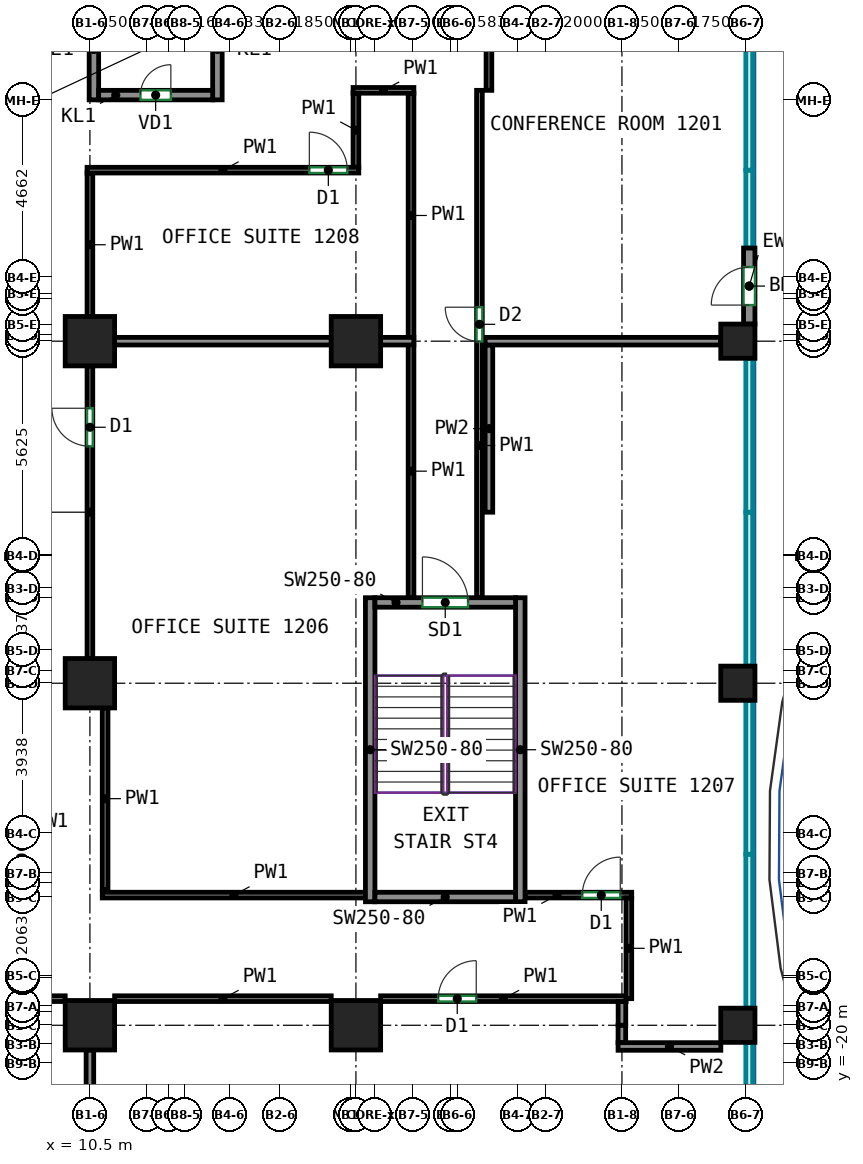
"""IFC4 building model, lengths in metres.
Left out: names, types, materials, properties, quantities, classifications, styles, units other than length and angle.
Written with IfcOpenShell. Run it as: python <this file> out.ifc"""

import sys

from ifc_helpers import new_model, si_unit, direction, frame, frame_2d, origin, origin_2d, place, context, subcontext, project, spatial, rectangle, extrude, source, transform, mapped, element, fill, save


model = new_model("IFC4")
c1 = context("Model", 3, precision=1e-05, world=origin(), true_north=direction((0.0, 1.0)))
c2 = subcontext(c1, "Body", "Model", "MODEL_VIEW")
j1 = project(units=[si_unit("LENGTHUNIT", "METRE"), si_unit("PLANEANGLEUNIT", "RADIAN")], contexts=[c1])
p1 = place(None, origin())
s1 = spatial("IfcSite", under=j1, at=p1, CompositionType="ELEMENT")
p2 = place(p1, origin())
s2 = spatial("IfcBuilding", under=s1, at=p2, CompositionType="ELEMENT")
p3 = place(p2, frame((0.0, 0.0, 55.0)))
s3 = spatial("IfcBuildingStorey", under=s2, at=p3, CompositionType="ELEMENT", Elevation=55.0)
m1 = source(origin(), c2, "Body", "SweptSolid", [
    extrude(rectangle(XDim=1.3, YDim=1.3, at=origin_2d()), origin(), (0.0, 0.0, 1.0), 3.6),
])
for number, where, z_axis, x_axis in (
    (1, (10.5, -19.0, 0.0), (0.0, 0.0, 1.0), (1.0, 0.0, 0.0)),
    (2, (10.5, -10.0, 0.0), (0.0, 0.0, 1.0), (1.0, 0.0, 0.0)),
    (3, (10.5, -1.0, 0.0), (0.0, 0.0, 1.0), (1.0, 0.0, 0.0)),
    (4, (17.5, -19.0, 0.0), (0.0, 0.0, 1.0), (1.0, 0.0, 0.0)),
    (5, (17.5, -1.0, 0.0), (0.0, 0.0, 1.0), (1.0, 0.0, 0.0)),
):
    element("IfcColumn", number, at=place(p3, frame(where, z_axis=z_axis, x_axis=x_axis)), inside=s3, PredefinedType="COLUMN", context=c2, shape_type="MappedRepresentation", body=[
        mapped(m1, transform((0.0, 0.0, 0.0))),
    ])
m2 = source(origin(), c2, "Body", "SweptSolid", [
    extrude(rectangle(XDim=0.9, YDim=0.9, at=origin_2d()), origin(), (0.0, 0.0, 1.0), 3.6),
])
for number, where, z_axis, x_axis in (
    (6, (27.55, -19.0, 0.0), (0.0, 0.0, 1.0), (1.0, 0.0, 0.0)),
    (7, (27.55, -10.0, 0.0), (0.0, 0.0, 1.0), (1.0, 0.0, 0.0)),
    (8, (27.55, -1.0, 0.0), (0.0, 0.0, 1.0), (1.0, 0.0, 0.0)),
):
    element("IfcColumn", number, at=place(p3, frame(where, z_axis=z_axis, x_axis=x_axis)), inside=s3, PredefinedType="COLUMN", context=c2, shape_type="MappedRepresentation", body=[
        mapped(m2, transform((0.0, 0.0, 0.0))),
    ])
m3 = source(origin(), c2, "Body", "SweptSolid", [
    extrude(rectangle(XDim=8.0, YDim=0.25, at=frame_2d((4.0, 0.0))), origin(), (0.0, 0.0, 1.0), 3.6),
])
for number, where, z_axis, x_axis in (
    (9, (17.875, -15.75, 0.0), (0.0, 0.0, 1.0), (0.0, 1.0, 0.0)),
    (10, (21.825, -15.75, 0.0), (0.0, 0.0, 1.0), (0.0, 1.0, 0.0)),
):
    element("IfcWall", number, at=place(p3, frame(where, z_axis=z_axis, x_axis=x_axis)), inside=s3, PredefinedType="SHEAR", context=c2, shape_type="MappedRepresentation", body=[
        mapped(m3, transform((0.0, 0.0, 0.0))),
    ])
m4 = source(origin(), c2, "Body", "SweptSolid", [
    extrude(rectangle(XDim=3.7, YDim=0.25, at=frame_2d((1.85, 0.0))), origin(), (0.0, 0.0, 1.0), 3.6),
])
p4 = place(p3, frame((18.0, -15.625, 0.0), z_axis=(0.0, 0.0, 1.0), x_axis=(1.0, 0.0, 0.0)))
e11 = element("IfcWall", 11, at=p4, inside=s3, PredefinedType="SHEAR", context=c2, shape_type="MappedRepresentation", body=[
    mapped(m4, transform((0.0, 0.0, 0.0))),
])
p5 = place(p3, frame((18.0, -7.875, 0.0), z_axis=(0.0, 0.0, 1.0), x_axis=(1.0, 0.0, 0.0)))
e12 = element("IfcWall", 12, at=p5, inside=s3, PredefinedType="SHEAR", context=c2, shape_type="MappedRepresentation", body=[
    mapped(m4, transform((0.0, 0.0, 0.0))),
])
p6 = place(p5, frame((1.25, 0.0, 0.0)))
e13 = element("IfcOpeningElement", 13, at=p6, cuts=e12, PredefinedType="OPENING", context=c2, shape_type="SweptSolid", body=[
    extrude(rectangle(XDim=1.2, YDim=2.1, at=frame_2d((0.6, 1.05))), frame((0.0, 0.135, 0.0), z_axis=(0.0, -1.0, 0.0), x_axis=(1.0, 0.0, 0.0)), (0.0, 0.0, 1.0), 0.27),
])
m5 = source(origin(), c2, "Body", "SweptSolid", [
    extrude(rectangle(XDim=2.0, YDim=0.3, at=frame_2d((1.0, 0.0))), origin(), (0.0, 0.0, 1.0), 3.6),
])
p7 = place(p3, frame((27.85, -0.55, 0.0), z_axis=(0.0, 0.0, 1.0), x_axis=(0.0, 1.0, 0.0)))
e14 = element("IfcWall", 14, at=p7, inside=s3, PredefinedType="SOLIDWALL", context=c2, shape_type="MappedRepresentation", body=[
    mapped(m5, transform((0.0, 0.0, 0.0))),
])
p8 = place(p7, frame((0.5, 0.0, 0.0)))
e15 = element("IfcOpeningElement", 15, at=p8, cuts=e14, PredefinedType="OPENING", context=c2, shape_type="SweptSolid", body=[
    extrude(rectangle(XDim=1.0, YDim=2.1, at=frame_2d((0.5, 1.05))), frame((0.0, 0.16, 0.0), z_axis=(0.0, -1.0, 0.0), x_axis=(1.0, 0.0, 0.0)), (0.0, 0.0, 1.0), 0.32),
])
m6 = source(origin(), c2, "Body", "SweptSolid", [
    extrude(rectangle(XDim=2.65, YDim=0.25, at=frame_2d((1.325, 0.0))), origin(), (0.0, 0.0, 1.0), 3.6),
])
for number, where, z_axis, x_axis in (
    (16, (10.605, 5.35, 0.0), (0.0, 0.0, 1.0), (0.0, 1.0, 0.0)),
    (17, (13.855, 5.35, 0.0), (0.0, 0.0, 1.0), (0.0, 1.0, 0.0)),
):
    element("IfcWall", number, at=place(p3, frame(where, z_axis=z_axis, x_axis=x_axis)), inside=s3, PredefinedType="PARTITIONING", context=c2, shape_type="MappedRepresentation", body=[
        mapped(m6, transform((0.0, 0.0, 0.0))),
    ])
m7 = source(origin(), c2, "Body", "SweptSolid", [
    extrude(rectangle(XDim=3.0, YDim=0.25, at=frame_2d((1.5, 0.0))), origin(), (0.0, 0.0, 1.0), 3.6),
])
p9 = place(p3, frame((10.73, 5.475, 0.0), z_axis=(0.0, 0.0, 1.0), x_axis=(1.0, 0.0, 0.0)))
e18 = element("IfcWall", 18, at=p9, inside=s3, PredefinedType="PARTITIONING", context=c2, shape_type="MappedRepresentation", body=[
    mapped(m7, transform((0.0, 0.0, 0.0))),
])
p10 = place(p9, frame((1.1, 0.0, 0.0)))
e19 = element("IfcOpeningElement", 19, at=p10, cuts=e18, PredefinedType="OPENING", context=c2, shape_type="SweptSolid", body=[
    extrude(rectangle(XDim=0.8, YDim=2.0, at=frame_2d((0.4, 1.0))), frame((0.0, 0.135, 0.0), z_axis=(0.0, -1.0, 0.0), x_axis=(1.0, 0.0, 0.0)), (0.0, 0.0, 1.0), 0.27),
])
p11 = place(p3, frame((4.15, -18.3, 0.0), z_axis=(0.0, 0.0, 1.0), x_axis=(1.0, 0.0, 0.0)))
e20 = element("IfcWall", 20, at=p11, inside=s3, PredefinedType="PARTITIONING", context=c2, shape_type="SweptSolid", body=[
    extrude(rectangle(XDim=5.7, YDim=0.15, at=frame_2d((2.85, 0.0))), origin(), (0.0, 0.0, 1.0), 3.6),
])
p12 = place(p11, frame((3.372, 0.0, 0.0)))
e21 = element("IfcOpeningElement", 21, at=p12, cuts=e20, PredefinedType="OPENING", context=c2, shape_type="SweptSolid", body=[
    extrude(rectangle(XDim=0.9, YDim=2.1, at=frame_2d((0.45, 1.05))), frame((0.0, 0.085, 0.0), z_axis=(0.0, -1.0, 0.0), x_axis=(1.0, 0.0, 0.0)), (0.0, 0.0, 1.0), 0.17),
])
p13 = place(p3, frame((11.15, -18.3, 0.0), z_axis=(0.0, 0.0, 1.0), x_axis=(1.0, 0.0, 0.0)))
e22 = element("IfcWall", 22, at=p13, inside=s3, PredefinedType="PARTITIONING", context=c2, shape_type="SweptSolid", body=[
    extrude(rectangle(XDim=5.7, YDim=0.15, at=frame_2d((2.85, 0.0))), origin(), (0.0, 0.0, 1.0), 3.6),
])
p14 = place(p3, frame((18.15, -18.3, 0.0), z_axis=(0.0, 0.0, 1.0), x_axis=(1.0, 0.0, 0.0)))
e23 = element("IfcWall", 23, at=p14, inside=s3, PredefinedType="PARTITIONING", context=c2, shape_type="SweptSolid", body=[
    extrude(rectangle(XDim=6.46, YDim=0.15, at=frame_2d((3.23, 0.0))), origin(), (0.0, 0.0, 1.0), 3.6),
])
p15 = place(p14, frame((1.516, 0.0, 0.0)))
e24 = element("IfcOpeningElement", 24, at=p15, cuts=e23, PredefinedType="OPENING", context=c2, shape_type="SweptSolid", body=[
    extrude(rectangle(XDim=1.0, YDim=2.1, at=frame_2d((0.5, 1.05))), frame((0.0, 0.085, 0.0), z_axis=(0.0, -1.0, 0.0), x_axis=(1.0, 0.0, 0.0)), (0.0, 0.0, 1.0), 0.17),
])
p16 = place(p3, frame((10.5, -9.35, 0.0), z_axis=(0.0, 0.0, 1.0), x_axis=(0.0, 1.0, 0.0)))
e25 = element("IfcWall", 25, at=p16, inside=s3, PredefinedType="PARTITIONING", context=c2, shape_type="SweptSolid", body=[
    extrude(rectangle(XDim=7.7, YDim=0.15, at=frame_2d((3.85, 0.0))), origin(), (0.0, 0.0, 1.0), 2.95),
])
p17 = place(p16, frame((5.585, 0.0, 0.0)))
e26 = element("IfcOpeningElement", 26, at=p17, cuts=e25, PredefinedType="OPENING", context=c2, shape_type="SweptSolid", body=[
    extrude(rectangle(XDim=1.0, YDim=2.1, at=frame_2d((0.5, 1.05))), frame((0.0, 0.085, 0.0), z_axis=(0.0, -1.0, 0.0), x_axis=(1.0, 0.0, 0.0)), (0.0, 0.0, 1.0), 0.17),
])
p18 = place(p3, frame((10.9, -15.425, 0.0), z_axis=(0.0, 0.0, 1.0), x_axis=(0.0, 1.0, 0.0)))
e27 = element("IfcWall", 27, at=p18, inside=s3, PredefinedType="PARTITIONING", context=c2, shape_type="SweptSolid", body=[
    extrude(rectangle(XDim=4.775, YDim=0.15, at=frame_2d((2.388, 0.0))), origin(), (0.0, 0.0, 1.0), 3.6),
])
p19 = place(p3, frame((10.825, -15.575, 0.0), z_axis=(0.0, 0.0, 1.0), x_axis=(1.0, 0.0, 0.0)))
e28 = element("IfcWall", 28, at=p19, inside=s3, PredefinedType="PARTITIONING", context=c2, shape_type="SweptSolid", body=[
    extrude(rectangle(XDim=6.925, YDim=0.15, at=frame_2d((3.462, 0.0))), origin(), (0.0, 0.0, 1.0), 3.6),
])
p20 = place(p3, frame((18.95, -7.75, 0.0), z_axis=(0.0, 0.0, 1.0), x_axis=(0.0, 1.0, 0.0)))
e29 = element("IfcWall", 29, at=p20, inside=s3, PredefinedType="PARTITIONING", context=c2, shape_type="SweptSolid", body=[
    extrude(rectangle(XDim=6.66, YDim=0.15, at=frame_2d((3.33, 0.0))), origin(), (0.0, 0.0, 1.0), 3.6),
])
p21 = place(p3, frame((21.95, -15.575, 0.0), z_axis=(0.0, 0.0, 1.0), x_axis=(1.0, 0.0, 0.0)))
e30 = element("IfcWall", 30, at=p21, inside=s3, PredefinedType="PARTITIONING", context=c2, shape_type="SweptSolid", body=[
    extrude(rectangle(XDim=2.807, YDim=0.15, at=frame_2d((1.404, 0.0))), origin(), (0.0, 0.0, 1.0), 3.6),
])
p22 = place(p21, frame((1.506, 0.0, 0.0)))
e31 = element("IfcOpeningElement", 31, at=p22, cuts=e30, PredefinedType="OPENING", context=c2, shape_type="SweptSolid", body=[
    extrude(rectangle(XDim=1.0, YDim=2.1, at=frame_2d((0.5, 1.05))), frame((0.0, 0.085, 0.0), z_axis=(0.0, -1.0, 0.0), x_axis=(1.0, 0.0, 0.0)), (0.0, 0.0, 1.0), 0.17),
])
p23 = place(p3, frame((24.682, -18.3, 0.0), z_axis=(0.0, 0.0, 1.0), x_axis=(0.0, 1.0, 0.0)))
e32 = element("IfcWall", 32, at=p23, inside=s3, PredefinedType="PARTITIONING", context=c2, shape_type="SweptSolid", body=[
    extrude(rectangle(XDim=2.65, YDim=0.15, at=frame_2d((1.325, 0.0))), origin(), (0.0, 0.0, 1.0), 3.6),
])
p24 = place(p3, frame((20.75, -7.75, 0.0), z_axis=(0.0, 0.0, 1.0), x_axis=(0.0, 1.0, 0.0)))
e33 = element("IfcWall", 33, at=p24, inside=s3, PredefinedType="PARTITIONING", context=c2, shape_type="SweptSolid", body=[
    extrude(rectangle(XDim=13.35, YDim=0.15, at=frame_2d((6.675, 0.0))), origin(), (0.0, 0.0, 1.0), 3.6),
])
p25 = place(p24, frame((6.744, 0.0, 0.0)))
e34 = element("IfcOpeningElement", 34, at=p25, cuts=e33, PredefinedType="OPENING", context=c2, shape_type="SweptSolid", body=[
    extrude(rectangle(XDim=0.9, YDim=2.1, at=frame_2d((0.45, 1.05))), frame((0.0, 0.085, 0.0), z_axis=(0.0, -1.0, 0.0), x_axis=(1.0, 0.0, 0.0)), (0.0, 0.0, 1.0), 0.17),
])
p26 = place(p3, frame((10.5, -0.35, 0.0), z_axis=(0.0, 0.0, 1.0), x_axis=(0.0, 1.0, 0.0)))
e35 = element("IfcWall", 35, at=p26, inside=s3, PredefinedType="PARTITIONING", context=c2, shape_type="SweptSolid", body=[
    extrude(rectangle(XDim=3.775, YDim=0.15, at=frame_2d((1.888, 0.0))), origin(), (0.0, 0.0, 1.0), 3.6),
])
p27 = place(p3, frame((18.95, -0.91, 0.0), z_axis=(0.0, 0.0, 1.0), x_axis=(0.0, 1.0, 0.0)))
e36 = element("IfcWall", 36, at=p27, inside=s3, PredefinedType="PARTITIONING", context=c2, shape_type="SweptSolid", body=[
    extrude(rectangle(XDim=6.435, YDim=0.15, at=frame_2d((3.217, 0.0))), origin(), (0.0, 0.0, 1.0), 3.6),
])
p28 = place(p3, frame((17.425, 5.6, 0.0), z_axis=(0.0, 0.0, 1.0), x_axis=(1.0, 0.0, 0.0)))
e37 = element("IfcWall", 37, at=p28, inside=s3, PredefinedType="PARTITIONING", context=c2, shape_type="SweptSolid", body=[
    extrude(rectangle(XDim=1.6, YDim=0.15, at=frame_2d((0.8, 0.0))), origin(), (0.0, 0.0, 1.0), 3.6),
])
p29 = place(p3, frame((17.5, 3.575, 0.0), z_axis=(0.0, 0.0, 1.0), x_axis=(0.0, 1.0, 0.0)))
e38 = element("IfcWall", 38, at=p29, inside=s3, PredefinedType="PARTITIONING", context=c2, shape_type="SweptSolid", body=[
    extrude(rectangle(XDim=1.95, YDim=0.15, at=frame_2d((0.975, 0.0))), origin(), (0.0, 0.0, 1.0), 3.6),
])
p30 = place(p3, frame((10.425, 3.5, 0.0), z_axis=(0.0, 0.0, 1.0), x_axis=(1.0, 0.0, 0.0)))
e39 = element("IfcWall", 39, at=p30, inside=s3, PredefinedType="PARTITIONING", context=c2, shape_type="SweptSolid", body=[
    extrude(rectangle(XDim=7.15, YDim=0.15, at=frame_2d((3.575, 0.0))), origin(), (0.0, 0.0, 1.0), 3.6),
])
p31 = place(p30, frame((5.849, 0.0, 0.0)))
e40 = element("IfcOpeningElement", 40, at=p31, cuts=e39, PredefinedType="OPENING", context=c2, shape_type="SweptSolid", body=[
    extrude(rectangle(XDim=1.0, YDim=2.1, at=frame_2d((0.5, 1.05))), frame((0.0, 0.085, 0.0), z_axis=(0.0, -1.0, 0.0), x_axis=(1.0, 0.0, 0.0)), (0.0, 0.0, 1.0), 0.17),
])
p32 = place(p3, frame((21.0, 5.6, 0.0), z_axis=(0.0, 0.0, 1.0), x_axis=(0.0, 1.0, 0.0)))
e41 = element("IfcWall", 41, at=p32, inside=s3, PredefinedType="PARTITIONING", context=c2, shape_type="SweptSolid", body=[
    extrude(rectangle(XDim=4.15, YDim=0.15, at=frame_2d((2.075, 0.0))), origin(), (0.0, 0.0, 1.0), 3.6),
])
p33 = place(p3, frame((10.5, -27.1, 0.0), z_axis=(0.0, 0.0, 1.0), x_axis=(0.0, 1.0, 0.0)))
e42 = element("IfcWall", 42, at=p33, inside=s3, PredefinedType="PARTITIONING", context=c2, shape_type="SweptSolid", body=[
    extrude(rectangle(XDim=7.45, YDim=0.2, at=frame_2d((3.725, 0.0))), origin(), (0.0, 0.0, 1.0), 2.95),
])
p34 = place(p3, frame((24.498, -19.458, 0.0), z_axis=(0.0, 0.0, 1.0), x_axis=(0.0, 1.0, 0.0)))
e43 = element("IfcWall", 43, at=p34, inside=s3, PredefinedType="PARTITIONING", context=c2, shape_type="SweptSolid", body=[
    extrude(rectangle(XDim=0.46, YDim=0.2, at=frame_2d((0.23, 0.0))), origin(), (0.0, 0.0, 1.0), 2.95),
])
p35 = place(p3, frame((27.102, -19.558, 0.0), z_axis=(0.0, 0.0, 1.0), x_axis=(-1.0, 0.0, 0.0)))
e44 = element("IfcWall", 44, at=p35, inside=s3, PredefinedType="PARTITIONING", context=c2, shape_type="SweptSolid", body=[
    extrude(rectangle(XDim=2.704, YDim=0.2, at=frame_2d((1.352, 0.0))), origin(), (0.0, 0.0, 1.0), 3.6),
])
p36 = place(p3, frame((24.5, -18.998, 0.0), z_axis=(0.0, 0.0, 1.0), x_axis=(0.0, 1.0, 0.0)))
e45 = element("IfcWall", 45, at=p36, inside=s3, PredefinedType="PARTITIONING", context=c2, shape_type="SweptSolid", body=[
    extrude(rectangle(XDim=0.622, YDim=0.2, at=frame_2d((0.311, 0.0))), origin(), (0.0, 0.0, 1.0), 2.95),
])
p37 = place(p3, frame((11.15, -1.0, 0.0), z_axis=(0.0, 0.0, 1.0), x_axis=(1.0, 0.0, 0.0)))
e46 = element("IfcWall", 46, at=p37, inside=s3, PredefinedType="PARTITIONING", context=c2, shape_type="SweptSolid", body=[
    extrude(rectangle(XDim=5.7, YDim=0.2, at=frame_2d((2.85, 0.0))), origin(), (0.0, 0.0, 1.0), 2.95),
])
p38 = place(p3, frame((18.15, -1.0, 0.0), z_axis=(0.0, 0.0, 1.0), x_axis=(1.0, 0.0, 0.0)))
e47 = element("IfcWall", 47, at=p38, inside=s3, PredefinedType="PARTITIONING", context=c2, shape_type="SweptSolid", body=[
    extrude(rectangle(XDim=0.874, YDim=0.2, at=frame_2d((0.437, 0.0))), origin(), (0.0, 0.0, 1.0), 2.95),
])
p39 = place(p3, frame((21.0, -1.1, 0.0), z_axis=(0.0, 0.0, 1.0), x_axis=(0.0, -1.0, 0.0)))
e48 = element("IfcWall", 48, at=p39, inside=s3, PredefinedType="PARTITIONING", context=c2, shape_type="SweptSolid", body=[
    extrude(rectangle(XDim=4.4, YDim=0.2, at=frame_2d((2.2, 0.0))), origin(), (0.0, 0.0, 1.0), 3.6),
])
p40 = place(p3, frame((20.9, -1.0, 0.0), z_axis=(0.0, 0.0, 1.0), x_axis=(1.0, 0.0, 0.0)))
e49 = element("IfcWall", 49, at=p40, inside=s3, PredefinedType="PARTITIONING", context=c2, shape_type="SweptSolid", body=[
    extrude(rectangle(XDim=6.2, YDim=0.2, at=frame_2d((3.1, 0.0))), origin(), (0.0, 0.0, 1.0), 2.95),
])
p41 = place(p8, origin())
e50 = element("IfcDoor", 50, at=p41, inside=s3, OperationType="SINGLE_SWING_LEFT", PredefinedType="DOOR", context=c2, shape_type="SweptSolid", body=[
    extrude(rectangle(XDim=1.0, YDim=2.1, at=frame_2d((0.5, 1.05))), frame((0.0, 0.025, 0.0), z_axis=(0.0, -1.0, 0.0), x_axis=(1.0, 0.0, 0.0)), (0.0, 0.0, 1.0), 0.05),
])
fill(e15, e50)
p42 = place(p10, origin())
e51 = element("IfcDoor", 51, at=p42, inside=s3, OperationType="SINGLE_SWING_RIGHT", PredefinedType="DOOR", context=c2, shape_type="SweptSolid", body=[
    extrude(rectangle(XDim=0.8, YDim=2.0, at=frame_2d((0.4, 1.0))), frame((0.0, 0.025, 0.0), z_axis=(0.0, -1.0, 0.0), x_axis=(1.0, 0.0, 0.0)), (0.0, 0.0, 1.0), 0.05),
])
fill(e19, e51)
p43 = place(p6, origin())
e52 = element("IfcDoor", 52, at=p43, inside=s3, OperationType="DOUBLE_DOOR_SINGLE_SWING", PredefinedType="DOOR", context=c2, shape_type="SweptSolid", body=[
    extrude(rectangle(XDim=1.2, YDim=2.1, at=frame_2d((0.6, 1.05))), frame((0.0, 0.025, 0.0), z_axis=(0.0, -1.0, 0.0), x_axis=(1.0, 0.0, 0.0)), (0.0, 0.0, 1.0), 0.05),
])
fill(e13, e52)
p44 = place(p15, origin())
e53 = element("IfcDoor", 53, at=p44, inside=s3, OperationType="SINGLE_SWING_RIGHT", PredefinedType="DOOR", context=c2, shape_type="SweptSolid", body=[
    extrude(rectangle(XDim=1.0, YDim=2.1, at=frame_2d((0.5, 1.05))), frame((0.0, 0.025, 0.0), z_axis=(0.0, -1.0, 0.0), x_axis=(1.0, 0.0, 0.0)), (0.0, 0.0, 1.0), 0.05),
])
fill(e24, e53)
p45 = place(p22, origin())
e54 = element("IfcDoor", 54, at=p45, inside=s3, OperationType="SINGLE_SWING_RIGHT", PredefinedType="DOOR", context=c2, shape_type="SweptSolid", body=[
    extrude(rectangle(XDim=1.0, YDim=2.1, at=frame_2d((0.5, 1.05))), frame((0.0, 0.025, 0.0), z_axis=(0.0, -1.0, 0.0), x_axis=(1.0, 0.0, 0.0)), (0.0, 0.0, 1.0), 0.05),
])
fill(e31, e54)
p46 = place(p17, origin())
e55 = element("IfcDoor", 55, at=p46, inside=s3, OperationType="SINGLE_SWING_RIGHT", PredefinedType="DOOR", context=c2, shape_type="SweptSolid", body=[
    extrude(rectangle(XDim=1.0, YDim=2.1, at=frame_2d((0.5, 1.05))), frame((0.0, 0.025, 0.0), z_axis=(0.0, -1.0, 0.0), x_axis=(1.0, 0.0, 0.0)), (0.0, 0.0, 1.0), 0.05),
])
fill(e26, e55)
p47 = place(p25, origin())
e56 = element("IfcDoor", 56, at=p47, inside=s3, OperationType="SINGLE_SWING_RIGHT", PredefinedType="DOOR", context=c2, shape_type="SweptSolid", body=[
    extrude(rectangle(XDim=0.9, YDim=2.1, at=frame_2d((0.45, 1.05))), frame((0.0, 0.025, 0.0), z_axis=(0.0, -1.0, 0.0), x_axis=(1.0, 0.0, 0.0)), (0.0, 0.0, 1.0), 0.05),
])
fill(e34, e56)
p48 = place(p31, origin())
e57 = element("IfcDoor", 57, at=p48, inside=s3, OperationType="SINGLE_SWING_LEFT", PredefinedType="DOOR", context=c2, shape_type="SweptSolid", body=[
    extrude(rectangle(XDim=1.0, YDim=2.1, at=frame_2d((0.5, 1.05))), frame((0.0, 0.025, 0.0), z_axis=(0.0, -1.0, 0.0), x_axis=(1.0, 0.0, 0.0)), (0.0, 0.0, 1.0), 0.05),
])
fill(e40, e57)
save(model, sys.argv[1])
